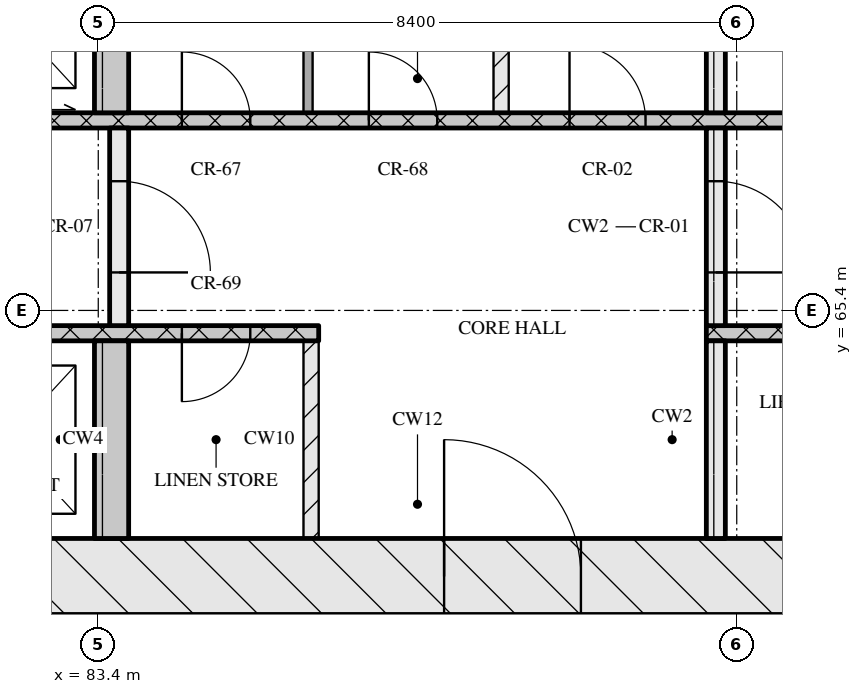
"""IFC4 building model, lengths in metres.
Left out: names, types, materials, properties, quantities, classifications, styles, units other than length and angle.
Written with IfcOpenShell. Run it as: python <this file> out.ifc"""

import sys

from ifc_helpers import new_model, si_unit, direction, frame, frame_2d, origin, place, context, subcontext, project, spatial, rectangle, extrude, element, fill, save


model = new_model("IFC4")
c1 = context("Model", 3, precision=1e-05, world=origin(), true_north=direction((0.0, 1.0)))
c2 = subcontext(c1, "Body", "Model", "MODEL_VIEW")
j1 = project(units=[si_unit("LENGTHUNIT", "METRE"), si_unit("PLANEANGLEUNIT", "RADIAN")], contexts=[c1])
p1 = place(None, origin())
s1 = spatial("IfcSite", under=j1, at=p1, CompositionType="ELEMENT")
p2 = place(p1, origin())
s2 = spatial("IfcBuilding", under=s1, at=p2, CompositionType="ELEMENT")
p3 = place(p2, frame((0.0, 0.0, 134.85)))
s3 = spatial("IfcBuildingStorey", under=s2, at=p3, CompositionType="ELEMENT", Elevation=134.85)
p4 = place(p3, frame((66.8, 61.9, 0.0), z_axis=(0.0, 0.0, 1.0), x_axis=(1.0, 0.0, 0.0)))
e1 = element("IfcWall", 1, at=p4, inside=s3, PredefinedType="SOLIDWALL", context=c2, shape_type="SweptSolid", body=[
    extrude(rectangle(XDim=41.6, YDim=1.0, at=frame_2d((20.8, 0.0))), origin(), (0.0, 0.0, 1.0), 3.32),
])
p5 = place(p4, frame((21.15, 0.0, 0.0)))
e2 = element("IfcOpeningElement", 2, at=p5, cuts=e1, PredefinedType="OPENING", context=c2, shape_type="SweptSolid", body=[
    extrude(rectangle(XDim=1.8, YDim=2.1, at=frame_2d((0.9, 1.05))), frame((0.0, 0.51, 0.0), z_axis=(0.0, -1.0, 0.0), x_axis=(1.0, 0.0, 0.0)), (0.0, 0.0, 1.0), 1.02),
])
p6 = place(p3, frame((83.575, 62.4, 0.0), z_axis=(0.0, 0.0, 1.0), x_axis=(0.0, 1.0, 0.0)))
e3 = element("IfcWall", 3, at=p6, inside=s3, PredefinedType="SOLIDWALL", context=c2, shape_type="SweptSolid", body=[
    extrude(rectangle(XDim=2.6, YDim=0.45, at=frame_2d((1.3, 0.0))), origin(), (0.0, 0.0, 1.0), 3.32),
])
p7 = place(p3, frame((86.2, 62.4, 0.0), z_axis=(0.0, 0.0, 1.0), x_axis=(0.0, 1.0, 0.0)))
e4 = element("IfcWall", 4, at=p7, inside=s3, PredefinedType="PARTITIONING", context=c2, shape_type="SweptSolid", body=[
    extrude(rectangle(XDim=2.6, YDim=0.2, at=frame_2d((1.3, 0.0))), origin(), (0.0, 0.0, 1.0), 3.32),
])
p8 = place(p3, frame((91.525, 62.4, 0.0), z_axis=(0.0, 0.0, 1.0), x_axis=(0.0, 1.0, 0.0)))
e5 = element("IfcWall", 5, at=p8, inside=s3, PredefinedType="SOLIDWALL", context=c2, shape_type="SweptSolid", body=[
    extrude(rectangle(XDim=2.6, YDim=0.25, at=frame_2d((1.3, 0.0))), origin(), (0.0, 0.0, 1.0), 3.32),
])
p9 = place(p3, frame((67.8, 65.1, 0.0), z_axis=(0.0, 0.0, 1.0), x_axis=(1.0, 0.0, 0.0)))
e6 = element("IfcWall", 6, at=p9, inside=s3, PredefinedType="SOLIDWALL", context=c2, shape_type="SweptSolid", body=[
    extrude(rectangle(XDim=18.5, YDim=0.2, at=frame_2d((9.25, 0.0))), origin(), (0.0, 0.0, 1.0), 3.32),
])
p10 = place(p9, frame((7.27, 0.0, 0.0)))
e7 = element("IfcOpeningElement", 7, at=p10, cuts=e6, PredefinedType="OPENING", context=c2, shape_type="SweptSolid", body=[
    extrude(rectangle(XDim=0.9, YDim=2.1, at=frame_2d((0.45, 1.05))), frame((0.0, 0.11, 0.0), z_axis=(0.0, -1.0, 0.0), x_axis=(1.0, 0.0, 0.0)), (0.0, 0.0, 1.0), 0.22),
])
p11 = place(p9, frame((8.85, 0.0, 0.0)))
e8 = element("IfcOpeningElement", 8, at=p11, cuts=e6, PredefinedType="OPENING", context=c2, shape_type="SweptSolid", body=[
    extrude(rectangle(XDim=1.1, YDim=2.1, at=frame_2d((0.55, 1.05))), frame((0.0, 0.11, 0.0), z_axis=(0.0, -1.0, 0.0), x_axis=(1.0, 0.0, 0.0)), (0.0, 0.0, 1.0), 0.22),
])
p12 = place(p9, frame((11.35, 0.0, 0.0)))
e9 = element("IfcOpeningElement", 9, at=p12, cuts=e6, PredefinedType="OPENING", context=c2, shape_type="SweptSolid", body=[
    extrude(rectangle(XDim=1.1, YDim=2.1, at=frame_2d((0.55, 1.05))), frame((0.0, 0.11, 0.0), z_axis=(0.0, -1.0, 0.0), x_axis=(1.0, 0.0, 0.0)), (0.0, 0.0, 1.0), 0.22),
])
p13 = place(p9, frame((13.85, 0.0, 0.0)))
e10 = element("IfcOpeningElement", 10, at=p13, cuts=e6, PredefinedType="OPENING", context=c2, shape_type="SweptSolid", body=[
    extrude(rectangle(XDim=1.1, YDim=2.1, at=frame_2d((0.55, 1.05))), frame((0.0, 0.11, 0.0), z_axis=(0.0, -1.0, 0.0), x_axis=(1.0, 0.0, 0.0)), (0.0, 0.0, 1.0), 0.22),
])
p14 = place(p9, frame((16.7, 0.0, 0.0)))
e11 = element("IfcOpeningElement", 11, at=p14, cuts=e6, PredefinedType="OPENING", context=c2, shape_type="SweptSolid", body=[
    extrude(rectangle(XDim=0.9, YDim=2.1, at=frame_2d((0.45, 1.05))), frame((0.0, 0.11, 0.0), z_axis=(0.0, -1.0, 0.0), x_axis=(1.0, 0.0, 0.0)), (0.0, 0.0, 1.0), 0.22),
])
p15 = place(p3, frame((91.4, 65.1, 0.0), z_axis=(0.0, 0.0, 1.0), x_axis=(1.0, 0.0, 0.0)))
e12 = element("IfcWall", 12, at=p15, inside=s3, PredefinedType="SOLIDWALL", context=c2, shape_type="SweptSolid", body=[
    extrude(rectangle(XDim=16.0, YDim=0.2, at=frame_2d((8.0, 0.0))), origin(), (0.0, 0.0, 1.0), 3.32),
])
p16 = place(p15, frame((7.83, 0.0, 0.0)))
e13 = element("IfcOpeningElement", 13, at=p16, cuts=e12, PredefinedType="OPENING", context=c2, shape_type="SweptSolid", body=[
    extrude(rectangle(XDim=0.9, YDim=2.1, at=frame_2d((0.45, 1.05))), frame((0.0, 0.11, 0.0), z_axis=(0.0, -1.0, 0.0), x_axis=(1.0, 0.0, 0.0)), (0.0, 0.0, 1.0), 0.22),
])
p17 = place(p3, frame((83.675, 65.2, 0.0), z_axis=(0.0, 0.0, 1.0), x_axis=(0.0, 1.0, 0.0)))
e14 = element("IfcWall", 14, at=p17, inside=s3, PredefinedType="SOLIDWALL", context=c2, shape_type="SweptSolid", body=[
    extrude(rectangle(XDim=2.6, YDim=0.25, at=frame_2d((1.3, 0.0))), origin(), (0.0, 0.0, 1.0), 3.32),
])
p18 = place(p17, frame((0.7, 0.0, 0.0)))
e15 = element("IfcOpeningElement", 15, at=p18, cuts=e14, PredefinedType="OPENING", context=c2, shape_type="SweptSolid", body=[
    extrude(rectangle(XDim=1.2, YDim=2.1, at=frame_2d((0.6, 1.05))), frame((0.0, 0.135, 0.0), z_axis=(0.0, -1.0, 0.0), x_axis=(1.0, 0.0, 0.0)), (0.0, 0.0, 1.0), 0.27),
])
p19 = place(p3, frame((91.525, 65.2, 0.0), z_axis=(0.0, 0.0, 1.0), x_axis=(0.0, 1.0, 0.0)))
e16 = element("IfcWall", 16, at=p19, inside=s3, PredefinedType="SOLIDWALL", context=c2, shape_type="SweptSolid", body=[
    extrude(rectangle(XDim=2.6, YDim=0.25, at=frame_2d((1.3, 0.0))), origin(), (0.0, 0.0, 1.0), 3.32),
])
p20 = place(p19, frame((0.7, 0.0, 0.0)))
e17 = element("IfcOpeningElement", 17, at=p20, cuts=e16, PredefinedType="OPENING", context=c2, shape_type="SweptSolid", body=[
    extrude(rectangle(XDim=1.2, YDim=2.1, at=frame_2d((0.6, 1.05))), frame((0.0, 0.135, 0.0), z_axis=(0.0, -1.0, 0.0), x_axis=(1.0, 0.0, 0.0)), (0.0, 0.0, 1.0), 0.27),
])
p21 = place(p3, frame((76.05, 67.9, 0.0), z_axis=(0.0, 0.0, 1.0), x_axis=(1.0, 0.0, 0.0)))
e18 = element("IfcWall", 18, at=p21, inside=s3, PredefinedType="SOLIDWALL", context=c2, shape_type="SweptSolid", body=[
    extrude(rectangle(XDim=23.1, YDim=0.2, at=frame_2d((11.55, 0.0))), origin(), (0.0, 0.0, 1.0), 3.32),
])
p22 = place(p21, frame((0.6, 0.0, 0.0)))
e19 = element("IfcOpeningElement", 19, at=p22, cuts=e18, PredefinedType="OPENING", context=c2, shape_type="SweptSolid", body=[
    extrude(rectangle(XDim=1.1, YDim=2.1, at=frame_2d((0.55, 1.05))), frame((0.0, 0.11, 0.0), z_axis=(0.0, -1.0, 0.0), x_axis=(1.0, 0.0, 0.0)), (0.0, 0.0, 1.0), 0.22),
])
p23 = place(p21, frame((3.1, 0.0, 0.0)))
e20 = element("IfcOpeningElement", 20, at=p23, cuts=e18, PredefinedType="OPENING", context=c2, shape_type="SweptSolid", body=[
    extrude(rectangle(XDim=1.1, YDim=2.1, at=frame_2d((0.55, 1.05))), frame((0.0, 0.11, 0.0), z_axis=(0.0, -1.0, 0.0), x_axis=(1.0, 0.0, 0.0)), (0.0, 0.0, 1.0), 0.22),
])
p24 = place(p21, frame((5.6, 0.0, 0.0)))
e21 = element("IfcOpeningElement", 21, at=p24, cuts=e18, PredefinedType="OPENING", context=c2, shape_type="SweptSolid", body=[
    extrude(rectangle(XDim=1.1, YDim=2.1, at=frame_2d((0.55, 1.05))), frame((0.0, 0.11, 0.0), z_axis=(0.0, -1.0, 0.0), x_axis=(1.0, 0.0, 0.0)), (0.0, 0.0, 1.0), 0.22),
])
p25 = place(p21, frame((8.45, 0.0, 0.0)))
e22 = element("IfcOpeningElement", 22, at=p25, cuts=e18, PredefinedType="OPENING", context=c2, shape_type="SweptSolid", body=[
    extrude(rectangle(XDim=0.9, YDim=2.1, at=frame_2d((0.45, 1.05))), frame((0.0, 0.11, 0.0), z_axis=(0.0, -1.0, 0.0), x_axis=(1.0, 0.0, 0.0)), (0.0, 0.0, 1.0), 0.22),
])
p26 = place(p21, frame((10.91, 0.0, 0.0)))
e23 = element("IfcOpeningElement", 23, at=p26, cuts=e18, PredefinedType="OPENING", context=c2, shape_type="SweptSolid", body=[
    extrude(rectangle(XDim=0.9, YDim=2.1, at=frame_2d((0.45, 1.05))), frame((0.0, 0.11, 0.0), z_axis=(0.0, -1.0, 0.0), x_axis=(1.0, 0.0, 0.0)), (0.0, 0.0, 1.0), 0.22),
])
p27 = place(p21, frame((13.55, 0.0, 0.0)))
e24 = element("IfcOpeningElement", 24, at=p27, cuts=e18, PredefinedType="OPENING", context=c2, shape_type="SweptSolid", body=[
    extrude(rectangle(XDim=1.0, YDim=2.1, at=frame_2d((0.5, 1.05))), frame((0.0, 0.11, 0.0), z_axis=(0.0, -1.0, 0.0), x_axis=(1.0, 0.0, 0.0)), (0.0, 0.0, 1.0), 0.22),
])
p28 = place(p3, frame((83.575, 68.0, 0.0), z_axis=(0.0, 0.0, 1.0), x_axis=(0.0, 1.0, 0.0)))
e25 = element("IfcWall", 25, at=p28, inside=s3, PredefinedType="SOLIDWALL", context=c2, shape_type="SweptSolid", body=[
    extrude(rectangle(XDim=2.6, YDim=0.45, at=frame_2d((1.3, 0.0))), origin(), (0.0, 0.0, 1.0), 3.32),
])
p29 = place(p3, frame((86.16, 68.0, 0.0), z_axis=(0.0, 0.0, 1.0), x_axis=(0.0, 1.0, 0.0)))
e26 = element("IfcWall", 26, at=p29, inside=s3, PredefinedType="PARTITIONING", context=c2, shape_type="SweptSolid", body=[
    extrude(rectangle(XDim=2.6, YDim=0.12, at=frame_2d((1.3, 0.0))), origin(), (0.0, 0.0, 1.0), 3.32),
])
p30 = place(p3, frame((88.7, 68.0, 0.0), z_axis=(0.0, 0.0, 1.0), x_axis=(0.0, 1.0, 0.0)))
e27 = element("IfcWall", 27, at=p30, inside=s3, PredefinedType="PARTITIONING", context=c2, shape_type="SweptSolid", body=[
    extrude(rectangle(XDim=2.6, YDim=0.2, at=frame_2d((1.3, 0.0))), origin(), (0.0, 0.0, 1.0), 3.32),
])
p31 = place(p3, frame((91.525, 68.0, 0.0), z_axis=(0.0, 0.0, 1.0), x_axis=(0.0, 1.0, 0.0)))
e28 = element("IfcWall", 28, at=p31, inside=s3, PredefinedType="SOLIDWALL", context=c2, shape_type="SweptSolid", body=[
    extrude(rectangle(XDim=2.6, YDim=0.25, at=frame_2d((1.3, 0.0))), origin(), (0.0, 0.0, 1.0), 3.32),
])
p32 = place(p5, origin())
e29 = element("IfcDoor", 29, at=p32, inside=s3, OperationType="DOUBLE_DOOR_SINGLE_SWING", PredefinedType="DOOR", context=c2, shape_type="SweptSolid", body=[
    extrude(rectangle(XDim=1.8, YDim=2.1, at=frame_2d((0.9, 1.05))), frame((0.0, 0.025, 0.0), z_axis=(0.0, -1.0, 0.0), x_axis=(1.0, 0.0, 0.0)), (0.0, 0.0, 1.0), 0.05),
])
fill(e2, e29)
p33 = place(p14, origin())
e30 = element("IfcDoor", 30, at=p33, inside=s3, OperationType="SINGLE_SWING_RIGHT", PredefinedType="DOOR", context=c2, shape_type="SweptSolid", body=[
    extrude(rectangle(XDim=0.9, YDim=2.1, at=frame_2d((0.45, 1.05))), frame((0.0, 0.025, 0.0), z_axis=(0.0, -1.0, 0.0), x_axis=(1.0, 0.0, 0.0)), (0.0, 0.0, 1.0), 0.05),
])
fill(e11, e30)
p34 = place(p18, origin())
e31 = element("IfcDoor", 31, at=p34, inside=s3, OperationType="SINGLE_SWING_RIGHT", PredefinedType="DOOR", context=c2, shape_type="SweptSolid", body=[
    extrude(rectangle(XDim=1.2, YDim=2.1, at=frame_2d((0.6, 1.05))), frame((0.0, 0.025, 0.0), z_axis=(0.0, -1.0, 0.0), x_axis=(1.0, 0.0, 0.0)), (0.0, 0.0, 1.0), 0.05),
])
fill(e15, e31)
p35 = place(p20, origin())
e32 = element("IfcDoor", 32, at=p35, inside=s3, OperationType="SINGLE_SWING_RIGHT", PredefinedType="DOOR", context=c2, shape_type="SweptSolid", body=[
    extrude(rectangle(XDim=1.2, YDim=2.1, at=frame_2d((0.6, 1.05))), frame((0.0, 0.025, 0.0), z_axis=(0.0, -1.0, 0.0), x_axis=(1.0, 0.0, 0.0)), (0.0, 0.0, 1.0), 0.05),
])
fill(e17, e32)
p36 = place(p25, origin())
e33 = element("IfcDoor", 33, at=p36, inside=s3, OperationType="SINGLE_SWING_LEFT", PredefinedType="DOOR", context=c2, shape_type="SweptSolid", body=[
    extrude(rectangle(XDim=0.9, YDim=2.1, at=frame_2d((0.45, 1.05))), frame((0.0, 0.025, 0.0), z_axis=(0.0, -1.0, 0.0), x_axis=(1.0, 0.0, 0.0)), (0.0, 0.0, 1.0), 0.05),
])
fill(e22, e33)
p37 = place(p26, origin())
e34 = element("IfcDoor", 34, at=p37, inside=s3, OperationType="SINGLE_SWING_LEFT", PredefinedType="DOOR", context=c2, shape_type="SweptSolid", body=[
    extrude(rectangle(XDim=0.9, YDim=2.1, at=frame_2d((0.45, 1.05))), frame((0.0, 0.025, 0.0), z_axis=(0.0, -1.0, 0.0), x_axis=(1.0, 0.0, 0.0)), (0.0, 0.0, 1.0), 0.05),
])
fill(e23, e34)
p38 = place(p27, origin())
e35 = element("IfcDoor", 35, at=p38, inside=s3, OperationType="SINGLE_SWING_LEFT", PredefinedType="DOOR", context=c2, shape_type="SweptSolid", body=[
    extrude(rectangle(XDim=1.0, YDim=2.1, at=frame_2d((0.5, 1.05))), frame((0.0, 0.025, 0.0), z_axis=(0.0, -1.0, 0.0), x_axis=(1.0, 0.0, 0.0)), (0.0, 0.0, 1.0), 0.05),
])
fill(e24, e35)
save(model, sys.argv[1])
